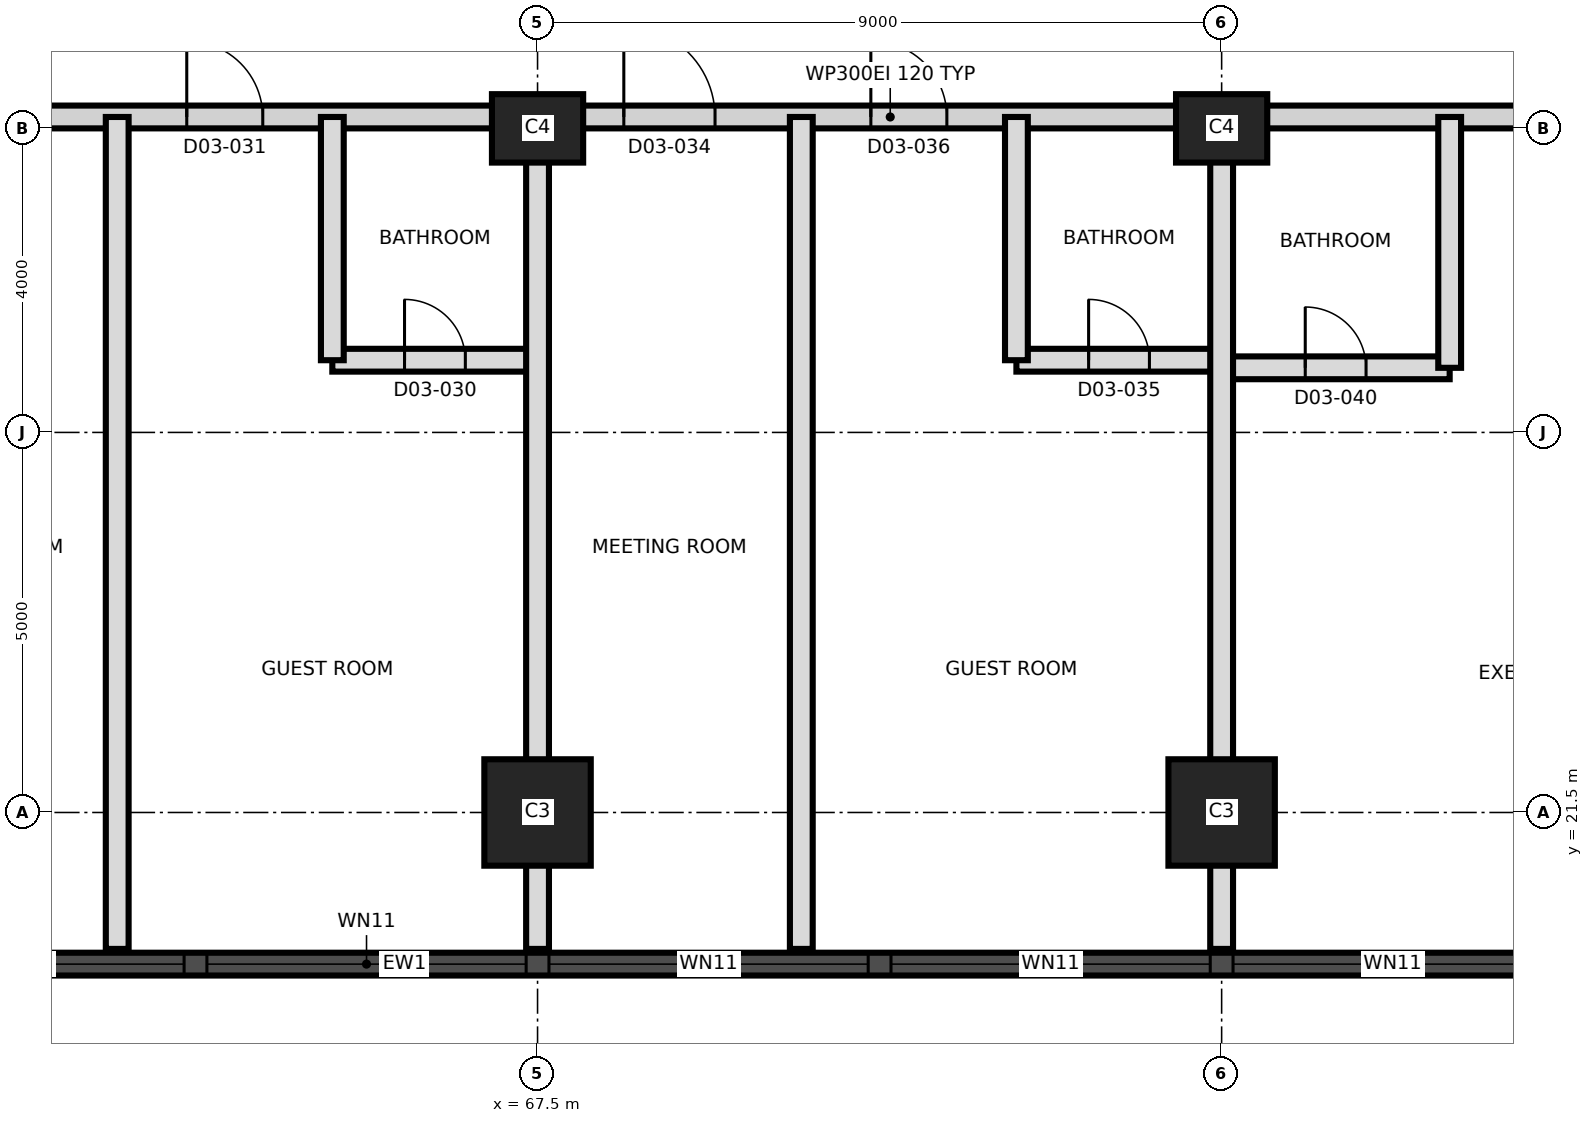
"""IFC4 building model, lengths in metres.
Left out: names, types, materials, properties, quantities, classifications, styles, units other than length and angle.
Written with IfcOpenShell. Run it as: python <this file> out.ifc"""

import sys

from ifc_helpers import new_model, si_unit, direction, frame, frame_2d, origin, origin_2d, place, context, subcontext, project, spatial, rectangle, extrude, element, fill, save


model = new_model("IFC4")
c1 = context("Model", 3, precision=1e-05, world=origin(), true_north=direction((0.0, 1.0)))
c2 = subcontext(c1, "Body", "Model", "MODEL_VIEW")
j1 = project(units=[si_unit("LENGTHUNIT", "METRE"), si_unit("PLANEANGLEUNIT", "RADIAN")], contexts=[c1])
p1 = place(None, origin())
s1 = spatial("IfcSite", under=j1, at=p1, CompositionType="ELEMENT")
p2 = place(p1, origin())
s2 = spatial("IfcBuilding", under=s1, at=p2, CompositionType="ELEMENT")
p3 = place(p2, frame((0.0, 0.0, 52.0)))
s3 = spatial("IfcBuildingStorey", under=s2, at=p3, CompositionType="ELEMENT", Elevation=52.0)
for number, where, z_axis, x_axis in (
    (1, (67.5, 21.5, 0.0), (0.0, 0.0, 1.0), (1.0, 0.0, 0.0)),
    (2, (76.5, 21.5, 0.0), (0.0, 0.0, 1.0), (1.0, 0.0, 0.0)),
):
    element("IfcColumn", number, at=place(p3, frame(where, z_axis=z_axis, x_axis=x_axis)), inside=s3, PredefinedType="COLUMN", context=c2, shape_type="SweptSolid", body=[
        extrude(rectangle(XDim=1.4, YDim=1.4, at=origin_2d()), origin(), (0.0, 0.0, 1.0), 3.7),
    ])
for number, where, z_axis, x_axis in (
    (3, (67.5, 30.5, 0.0), (0.0, 0.0, 1.0), (1.0, 0.0, 0.0)),
    (4, (76.5, 30.5, 0.0), (0.0, 0.0, 1.0), (1.0, 0.0, 0.0)),
):
    element("IfcColumn", number, at=place(p3, frame(where, z_axis=z_axis, x_axis=x_axis)), inside=s3, PredefinedType="COLUMN", context=c2, shape_type="SweptSolid", body=[
        extrude(rectangle(XDim=1.2, YDim=0.9, at=origin_2d()), origin(), (0.0, 0.0, 1.0), 3.7),
    ])
p4 = place(p3, frame((44.01, 19.505, 0.0), z_axis=(0.0, 0.0, 1.0), x_axis=(1.0, 0.0, 0.0)))
e5 = element("IfcWall", 5, at=p4, inside=s3, PredefinedType="SOLIDWALL", context=c2, shape_type="SweptSolid", body=[
    extrude(rectangle(XDim=43.478, YDim=0.3, at=frame_2d((21.739, 0.0))), origin(), (0.0, 0.0, 1.0), 3.4),
])
p5 = place(p4, frame((1.845, 0.0, 0.3)))
e6 = element("IfcOpeningElement", 6, at=p5, cuts=e5, PredefinedType="OPENING", context=c2, shape_type="SweptSolid", body=[
    extrude(rectangle(XDim=1.8, YDim=2.4, at=frame_2d((0.9, 1.2))), frame((0.0, 0.16, 0.0), z_axis=(0.0, -1.0, 0.0), x_axis=(1.0, 0.0, 0.0)), (0.0, 0.0, 1.0), 0.32),
])
p6 = place(p4, frame((5.64, 0.0, 0.9)))
e7 = element("IfcOpeningElement", 7, at=p6, cuts=e5, PredefinedType="OPENING", context=c2, shape_type="SweptSolid", body=[
    extrude(rectangle(XDim=4.2, YDim=1.5, at=frame_2d((2.1, 0.75))), frame((0.0, 0.16, 0.0), z_axis=(0.0, -1.0, 0.0), x_axis=(1.0, 0.0, 0.0)), (0.0, 0.0, 1.0), 0.32),
])
p7 = place(p4, frame((10.14, 0.0, 0.9)))
e8 = element("IfcOpeningElement", 8, at=p7, cuts=e5, PredefinedType="OPENING", context=c2, shape_type="SweptSolid", body=[
    extrude(rectangle(XDim=4.2, YDim=1.5, at=frame_2d((2.1, 0.75))), frame((0.0, 0.16, 0.0), z_axis=(0.0, -1.0, 0.0), x_axis=(1.0, 0.0, 0.0)), (0.0, 0.0, 1.0), 0.32),
])
p8 = place(p4, frame((14.64, 0.0, 0.9)))
e9 = element("IfcOpeningElement", 9, at=p8, cuts=e5, PredefinedType="OPENING", context=c2, shape_type="SweptSolid", body=[
    extrude(rectangle(XDim=4.2, YDim=1.5, at=frame_2d((2.1, 0.75))), frame((0.0, 0.16, 0.0), z_axis=(0.0, -1.0, 0.0), x_axis=(1.0, 0.0, 0.0)), (0.0, 0.0, 1.0), 0.32),
])
p9 = place(p4, frame((19.14, 0.0, 0.9)))
e10 = element("IfcOpeningElement", 10, at=p9, cuts=e5, PredefinedType="OPENING", context=c2, shape_type="SweptSolid", body=[
    extrude(rectangle(XDim=4.2, YDim=1.5, at=frame_2d((2.1, 0.75))), frame((0.0, 0.16, 0.0), z_axis=(0.0, -1.0, 0.0), x_axis=(1.0, 0.0, 0.0)), (0.0, 0.0, 1.0), 0.32),
])
p10 = place(p4, frame((23.64, 0.0, 0.9)))
e11 = element("IfcOpeningElement", 11, at=p10, cuts=e5, PredefinedType="OPENING", context=c2, shape_type="SweptSolid", body=[
    extrude(rectangle(XDim=4.2, YDim=1.5, at=frame_2d((2.1, 0.75))), frame((0.0, 0.16, 0.0), z_axis=(0.0, -1.0, 0.0), x_axis=(1.0, 0.0, 0.0)), (0.0, 0.0, 1.0), 0.32),
])
p11 = place(p4, frame((28.14, 0.0, 0.9)))
e12 = element("IfcOpeningElement", 12, at=p11, cuts=e5, PredefinedType="OPENING", context=c2, shape_type="SweptSolid", body=[
    extrude(rectangle(XDim=4.2, YDim=1.5, at=frame_2d((2.1, 0.75))), frame((0.0, 0.16, 0.0), z_axis=(0.0, -1.0, 0.0), x_axis=(1.0, 0.0, 0.0)), (0.0, 0.0, 1.0), 0.32),
])
p12 = place(p4, frame((32.64, 0.0, 0.9)))
e13 = element("IfcOpeningElement", 13, at=p12, cuts=e5, PredefinedType="OPENING", context=c2, shape_type="SweptSolid", body=[
    extrude(rectangle(XDim=4.2, YDim=1.5, at=frame_2d((2.1, 0.75))), frame((0.0, 0.16, 0.0), z_axis=(0.0, -1.0, 0.0), x_axis=(1.0, 0.0, 0.0)), (0.0, 0.0, 1.0), 0.32),
])
p13 = place(p4, frame((37.14, 0.0, 0.9)))
e14 = element("IfcOpeningElement", 14, at=p13, cuts=e5, PredefinedType="OPENING", context=c2, shape_type="SweptSolid", body=[
    extrude(rectangle(XDim=4.2, YDim=1.5, at=frame_2d((2.1, 0.75))), frame((0.0, 0.16, 0.0), z_axis=(0.0, -1.0, 0.0), x_axis=(1.0, 0.0, 0.0)), (0.0, 0.0, 1.0), 0.32),
])
p14 = place(p3, frame((76.5, 27.35, 0.0), z_axis=(0.0, 0.0, 1.0), x_axis=(1.0, 0.0, 0.0)))
e15 = element("IfcWall", 15, at=p14, inside=s3, PredefinedType="PARTITIONING", context=c2, shape_type="SweptSolid", body=[
    extrude(rectangle(XDim=3.0, YDim=0.3, at=frame_2d((1.5, 0.0))), origin(), (0.0, 0.0, 1.0), 3.4),
])
p15 = place(p14, frame((1.1, 0.0, 0.0)))
e16 = element("IfcOpeningElement", 16, at=p15, cuts=e15, PredefinedType="OPENING", context=c2, shape_type="SweptSolid", body=[
    extrude(rectangle(XDim=0.8, YDim=2.1, at=frame_2d((0.4, 1.05))), frame((0.0, 0.16, 0.0), z_axis=(0.0, -1.0, 0.0), x_axis=(1.0, 0.0, 0.0)), (0.0, 0.0, 1.0), 0.32),
])
p16 = place(p3, frame((64.8, 27.45, 0.0), z_axis=(0.0, 0.0, 1.0), x_axis=(1.0, 0.0, 0.0)))
e17 = element("IfcWall", 17, at=p16, inside=s3, PredefinedType="PARTITIONING", context=c2, shape_type="SweptSolid", body=[
    extrude(rectangle(XDim=2.7, YDim=0.3, at=frame_2d((1.35, 0.0))), origin(), (0.0, 0.0, 1.0), 3.4),
])
p17 = place(p16, frame((0.95, 0.0, 0.0)))
e18 = element("IfcOpeningElement", 18, at=p17, cuts=e17, PredefinedType="OPENING", context=c2, shape_type="SweptSolid", body=[
    extrude(rectangle(XDim=0.8, YDim=2.1, at=frame_2d((0.4, 1.05))), frame((0.0, 0.16, 0.0), z_axis=(0.0, -1.0, 0.0), x_axis=(1.0, 0.0, 0.0)), (0.0, 0.0, 1.0), 0.32),
])
p18 = place(p3, frame((73.8, 27.45, 0.0), z_axis=(0.0, 0.0, 1.0), x_axis=(1.0, 0.0, 0.0)))
e19 = element("IfcWall", 19, at=p18, inside=s3, PredefinedType="PARTITIONING", context=c2, shape_type="SweptSolid", body=[
    extrude(rectangle(XDim=2.7, YDim=0.3, at=frame_2d((1.35, 0.0))), origin(), (0.0, 0.0, 1.0), 3.4),
])
p19 = place(p18, frame((0.95, 0.0, 0.0)))
e20 = element("IfcOpeningElement", 20, at=p19, cuts=e19, PredefinedType="OPENING", context=c2, shape_type="SweptSolid", body=[
    extrude(rectangle(XDim=0.8, YDim=2.1, at=frame_2d((0.4, 1.05))), frame((0.0, 0.16, 0.0), z_axis=(0.0, -1.0, 0.0), x_axis=(1.0, 0.0, 0.0)), (0.0, 0.0, 1.0), 0.32),
])
p20 = place(p3, frame((58.95, 30.65, 0.0), z_axis=(0.0, 0.0, 1.0), x_axis=(1.0, 0.0, 0.0)))
e21 = element("IfcWall", 21, at=p20, inside=s3, PredefinedType="PARTITIONING", context=c2, shape_type="SweptSolid", body=[
    extrude(rectangle(XDim=26.38, YDim=0.3, at=frame_2d((13.19, 0.0))), origin(), (0.0, 0.0, 1.0), 3.4),
])
p21 = place(p20, frame((0.685, 0.0, 0.0)))
e22 = element("IfcOpeningElement", 22, at=p21, cuts=e21, PredefinedType="OPENING", context=c2, shape_type="SweptSolid", body=[
    extrude(rectangle(XDim=1.2, YDim=2.1, at=frame_2d((0.6, 1.05))), frame((0.0, 0.16, 0.0), z_axis=(0.0, -1.0, 0.0), x_axis=(1.0, 0.0, 0.0)), (0.0, 0.0, 1.0), 0.32),
])
p22 = place(p20, frame((3.935, 0.0, 0.0)))
e23 = element("IfcOpeningElement", 23, at=p22, cuts=e21, PredefinedType="OPENING", context=c2, shape_type="SweptSolid", body=[
    extrude(rectangle(XDim=1.0, YDim=2.1, at=frame_2d((0.5, 1.05))), frame((0.0, 0.16, 0.0), z_axis=(0.0, -1.0, 0.0), x_axis=(1.0, 0.0, 0.0)), (0.0, 0.0, 1.0), 0.32),
])
p23 = place(p20, frame((9.685, 0.0, 0.0)))
e24 = element("IfcOpeningElement", 24, at=p23, cuts=e21, PredefinedType="OPENING", context=c2, shape_type="SweptSolid", body=[
    extrude(rectangle(XDim=1.2, YDim=2.1, at=frame_2d((0.6, 1.05))), frame((0.0, 0.16, 0.0), z_axis=(0.0, -1.0, 0.0), x_axis=(1.0, 0.0, 0.0)), (0.0, 0.0, 1.0), 0.32),
])
p24 = place(p20, frame((12.935, 0.0, 0.0)))
e25 = element("IfcOpeningElement", 25, at=p24, cuts=e21, PredefinedType="OPENING", context=c2, shape_type="SweptSolid", body=[
    extrude(rectangle(XDim=1.0, YDim=2.1, at=frame_2d((0.5, 1.05))), frame((0.0, 0.16, 0.0), z_axis=(0.0, -1.0, 0.0), x_axis=(1.0, 0.0, 0.0)), (0.0, 0.0, 1.0), 0.32),
])
p25 = place(p20, frame((21.55, 0.0, 0.0)))
e26 = element("IfcOpeningElement", 26, at=p25, cuts=e21, PredefinedType="OPENING", context=c2, shape_type="SweptSolid", body=[
    extrude(rectangle(XDim=1.0, YDim=2.4, at=frame_2d((0.5, 1.2))), frame((0.0, 0.16, 0.0), z_axis=(0.0, -1.0, 0.0), x_axis=(1.0, 0.0, 0.0)), (0.0, 0.0, 1.0), 0.32),
])
p26 = place(p3, frame((61.97, 19.705, 0.0), z_axis=(0.0, 0.0, 1.0), x_axis=(0.0, 1.0, 0.0)))
e27 = element("IfcWall", 27, at=p26, inside=s3, PredefinedType="PARTITIONING", context=c2, shape_type="SweptSolid", body=[
    extrude(rectangle(XDim=10.945, YDim=0.3, at=frame_2d((5.472, 0.0))), origin(), (0.0, 0.0, 1.0), 3.4),
])
p27 = place(p3, frame((64.8, 27.45, 0.0), z_axis=(0.0, 0.0, 1.0), x_axis=(0.0, 1.0, 0.0)))
e28 = element("IfcWall", 28, at=p27, inside=s3, PredefinedType="PARTITIONING", context=c2, shape_type="SweptSolid", body=[
    extrude(rectangle(XDim=3.2, YDim=0.3, at=frame_2d((1.6, 0.0))), origin(), (0.0, 0.0, 1.0), 3.4),
])
for number, where, z_axis, x_axis in (
    (29, (67.5, 19.705, 0.0), (0.0, 0.0, 1.0), (0.0, 1.0, 0.0)),
    (30, (70.97, 19.705, 0.0), (0.0, 0.0, 1.0), (0.0, 1.0, 0.0)),
):
    element("IfcWall", number, at=place(p3, frame(where, z_axis=z_axis, x_axis=x_axis)), inside=s3, PredefinedType="PARTITIONING", context=c2, shape_type="SweptSolid", body=[
        extrude(rectangle(XDim=10.945, YDim=0.3, at=frame_2d((5.472, 0.0))), origin(), (0.0, 0.0, 1.0), 3.4),
    ])
p28 = place(p3, frame((73.8, 27.45, 0.0), z_axis=(0.0, 0.0, 1.0), x_axis=(0.0, 1.0, 0.0)))
e31 = element("IfcWall", 31, at=p28, inside=s3, PredefinedType="PARTITIONING", context=c2, shape_type="SweptSolid", body=[
    extrude(rectangle(XDim=3.2, YDim=0.3, at=frame_2d((1.6, 0.0))), origin(), (0.0, 0.0, 1.0), 3.4),
])
p29 = place(p3, frame((76.5, 19.705, 0.0), z_axis=(0.0, 0.0, 1.0), x_axis=(0.0, 1.0, 0.0)))
e32 = element("IfcWall", 32, at=p29, inside=s3, PredefinedType="PARTITIONING", context=c2, shape_type="SweptSolid", body=[
    extrude(rectangle(XDim=10.945, YDim=0.3, at=frame_2d((5.472, 0.0))), origin(), (0.0, 0.0, 1.0), 3.4),
])
p30 = place(p3, frame((79.5, 27.35, 0.0), z_axis=(0.0, 0.0, 1.0), x_axis=(0.0, 1.0, 0.0)))
e33 = element("IfcWall", 33, at=p30, inside=s3, PredefinedType="PARTITIONING", context=c2, shape_type="SweptSolid", body=[
    extrude(rectangle(XDim=3.3, YDim=0.3, at=frame_2d((1.65, 0.0))), origin(), (0.0, 0.0, 1.0), 3.4),
])
p31 = place(p8, origin())
e34 = element("IfcWindow", 34, at=p31, inside=s3, PartitioningType="SINGLE_PANEL", PredefinedType="WINDOW", context=c2, shape_type="SweptSolid", body=[
    extrude(rectangle(XDim=4.2, YDim=1.5, at=frame_2d((2.1, 0.75))), frame((0.0, 0.03, 0.0), z_axis=(0.0, -1.0, 0.0), x_axis=(1.0, 0.0, 0.0)), (0.0, 0.0, 1.0), 0.06),
])
fill(e9, e34)
p32 = place(p9, origin())
e35 = element("IfcWindow", 35, at=p32, inside=s3, PartitioningType="SINGLE_PANEL", PredefinedType="WINDOW", context=c2, shape_type="SweptSolid", body=[
    extrude(rectangle(XDim=4.2, YDim=1.5, at=frame_2d((2.1, 0.75))), frame((0.0, 0.03, 0.0), z_axis=(0.0, -1.0, 0.0), x_axis=(1.0, 0.0, 0.0)), (0.0, 0.0, 1.0), 0.06),
])
fill(e10, e35)
p33 = place(p10, origin())
e36 = element("IfcWindow", 36, at=p33, inside=s3, PartitioningType="SINGLE_PANEL", PredefinedType="WINDOW", context=c2, shape_type="SweptSolid", body=[
    extrude(rectangle(XDim=4.2, YDim=1.5, at=frame_2d((2.1, 0.75))), frame((0.0, 0.03, 0.0), z_axis=(0.0, -1.0, 0.0), x_axis=(1.0, 0.0, 0.0)), (0.0, 0.0, 1.0), 0.06),
])
fill(e11, e36)
p34 = place(p11, origin())
e37 = element("IfcWindow", 37, at=p34, inside=s3, PartitioningType="SINGLE_PANEL", PredefinedType="WINDOW", context=c2, shape_type="SweptSolid", body=[
    extrude(rectangle(XDim=4.2, YDim=1.5, at=frame_2d((2.1, 0.75))), frame((0.0, 0.03, 0.0), z_axis=(0.0, -1.0, 0.0), x_axis=(1.0, 0.0, 0.0)), (0.0, 0.0, 1.0), 0.06),
])
fill(e12, e37)
p35 = place(p12, origin())
e38 = element("IfcWindow", 38, at=p35, inside=s3, PartitioningType="SINGLE_PANEL", PredefinedType="WINDOW", context=c2, shape_type="SweptSolid", body=[
    extrude(rectangle(XDim=4.2, YDim=1.5, at=frame_2d((2.1, 0.75))), frame((0.0, 0.03, 0.0), z_axis=(0.0, -1.0, 0.0), x_axis=(1.0, 0.0, 0.0)), (0.0, 0.0, 1.0), 0.06),
])
fill(e13, e38)
p36 = place(p17, origin())
e39 = element("IfcDoor", 39, at=p36, inside=s3, OperationType="SINGLE_SWING_RIGHT", PredefinedType="DOOR", context=c2, shape_type="SweptSolid", body=[
    extrude(rectangle(XDim=0.8, YDim=2.1, at=frame_2d((0.4, 1.05))), frame((0.0, 0.025, 0.0), z_axis=(0.0, -1.0, 0.0), x_axis=(1.0, 0.0, 0.0)), (0.0, 0.0, 1.0), 0.05),
])
fill(e18, e39)
p37 = place(p22, origin())
e40 = element("IfcDoor", 40, at=p37, inside=s3, OperationType="SINGLE_SWING_LEFT", PredefinedType="DOOR", context=c2, shape_type="SweptSolid", body=[
    extrude(rectangle(XDim=1.0, YDim=2.1, at=frame_2d((0.5, 1.05))), frame((0.0, 0.025, 0.0), z_axis=(0.0, -1.0, 0.0), x_axis=(1.0, 0.0, 0.0)), (0.0, 0.0, 1.0), 0.05),
])
fill(e23, e40)
p38 = place(p23, origin())
e41 = element("IfcDoor", 41, at=p38, inside=s3, OperationType="SINGLE_SWING_RIGHT", PredefinedType="DOOR", context=c2, shape_type="SweptSolid", body=[
    extrude(rectangle(XDim=1.2, YDim=2.1, at=frame_2d((0.6, 1.05))), frame((0.0, 0.025, 0.0), z_axis=(0.0, -1.0, 0.0), x_axis=(1.0, 0.0, 0.0)), (0.0, 0.0, 1.0), 0.05),
])
fill(e24, e41)
p39 = place(p19, origin())
e42 = element("IfcDoor", 42, at=p39, inside=s3, OperationType="SINGLE_SWING_LEFT", PredefinedType="DOOR", context=c2, shape_type="SweptSolid", body=[
    extrude(rectangle(XDim=0.8, YDim=2.1, at=frame_2d((0.4, 1.05))), frame((0.0, 0.025, 0.0), z_axis=(0.0, -1.0, 0.0), x_axis=(1.0, 0.0, 0.0)), (0.0, 0.0, 1.0), 0.05),
])
fill(e20, e42)
p40 = place(p24, origin())
e43 = element("IfcDoor", 43, at=p40, inside=s3, OperationType="SINGLE_SWING_LEFT", PredefinedType="DOOR", context=c2, shape_type="SweptSolid", body=[
    extrude(rectangle(XDim=1.0, YDim=2.1, at=frame_2d((0.5, 1.05))), frame((0.0, 0.025, 0.0), z_axis=(0.0, -1.0, 0.0), x_axis=(1.0, 0.0, 0.0)), (0.0, 0.0, 1.0), 0.05),
])
fill(e25, e43)
p41 = place(p15, origin())
e44 = element("IfcDoor", 44, at=p41, inside=s3, OperationType="SINGLE_SWING_LEFT", PredefinedType="DOOR", context=c2, shape_type="SweptSolid", body=[
    extrude(rectangle(XDim=0.8, YDim=2.1, at=frame_2d((0.4, 1.05))), frame((0.0, 0.025, 0.0), z_axis=(0.0, -1.0, 0.0), x_axis=(1.0, 0.0, 0.0)), (0.0, 0.0, 1.0), 0.05),
])
fill(e16, e44)
save(model, sys.argv[1])
